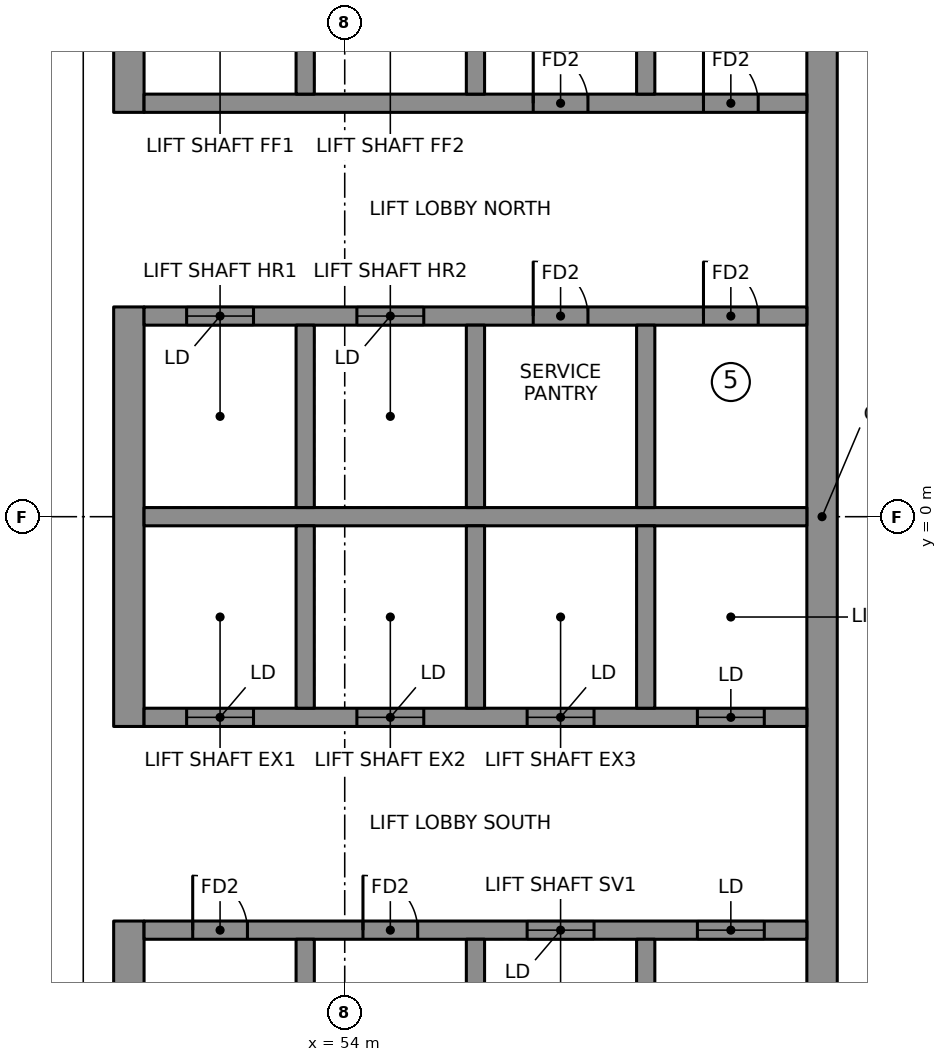
"""IFC4 building model, lengths in metres.
Left out: names, types, materials, properties, quantities, classifications, styles, units other than length and angle.
Written with IfcOpenShell. Run it as: python <this file> out.ifc"""

import sys

from ifc_helpers import new_model, si_unit, direction, frame, frame_2d, origin, place, context, subcontext, project, spatial, rectangle, extrude, element, fill, save


model = new_model("IFC4")
c1 = context("Model", 3, precision=1e-05, world=origin(), true_north=direction((0.0, 1.0)))
c2 = subcontext(c1, "Body", "Model", "MODEL_VIEW")
j1 = project(units=[si_unit("LENGTHUNIT", "METRE"), si_unit("PLANEANGLEUNIT", "RADIAN")], contexts=[c1])
p1 = place(None, origin())
s1 = spatial("IfcSite", under=j1, at=p1, CompositionType="ELEMENT")
p2 = place(p1, origin())
s2 = spatial("IfcBuilding", under=s1, at=p2, CompositionType="ELEMENT")
p3 = place(p2, frame((0.0, 0.0, 318.6)))
s3 = spatial("IfcBuildingStorey", under=s2, at=p3, CompositionType="ELEMENT", Elevation=318.6)
p4 = place(p3, frame((50.45, 6.65, 0.0), z_axis=(0.0, 0.0, 1.0), x_axis=(0.0, 1.0, 0.0)))
e1 = element("IfcWall", 1, at=p4, inside=s3, PredefinedType="SHEAR", context=c2, shape_type="SweptSolid", body=[
    extrude(rectangle(XDim=9.6, YDim=0.5, at=frame_2d((4.8, 0.0))), origin(), (0.0, 0.0, 1.0), 4.4),
])
p5 = place(p4, frame((6.5, 0.0, 0.0)))
e2 = element("IfcOpeningElement", 2, at=p5, cuts=e1, PredefinedType="OPENING", context=c2, shape_type="SweptSolid", body=[
    extrude(rectangle(XDim=1.1, YDim=2.1, at=frame_2d((0.55, 1.05))), frame((0.0, 0.26, 0.0), z_axis=(0.0, -1.0, 0.0), x_axis=(1.0, 0.0, 0.0)), (0.0, 0.0, 1.0), 0.52),
])
p6 = place(p3, frame((50.45, -3.45, 0.0), z_axis=(0.0, 0.0, 1.0), x_axis=(0.0, 1.0, 0.0)))
e3 = element("IfcWall", 3, at=p6, inside=s3, PredefinedType="SHEAR", context=c2, shape_type="SweptSolid", body=[
    extrude(rectangle(XDim=6.9, YDim=0.5, at=frame_2d((3.45, 0.0))), origin(), (0.0, 0.0, 1.0), 4.4),
])
p7 = place(p3, frame((50.45, -16.25, 0.0), z_axis=(0.0, 0.0, 1.0), x_axis=(0.0, 1.0, 0.0)))
e4 = element("IfcWall", 4, at=p7, inside=s3, PredefinedType="SHEAR", context=c2, shape_type="SweptSolid", body=[
    extrude(rectangle(XDim=9.6, YDim=0.5, at=frame_2d((4.8, 0.0))), origin(), (0.0, 0.0, 1.0), 4.4),
])
p8 = place(p7, frame((2.0, 0.0, 0.0)))
e5 = element("IfcOpeningElement", 5, at=p8, cuts=e4, PredefinedType="OPENING", context=c2, shape_type="SweptSolid", body=[
    extrude(rectangle(XDim=1.1, YDim=2.1, at=frame_2d((0.55, 1.05))), frame((0.0, 0.26, 0.0), z_axis=(0.0, -1.0, 0.0), x_axis=(1.0, 0.0, 0.0)), (0.0, 0.0, 1.0), 0.52),
])
p9 = place(p3, frame((61.85, -9.95, 0.0), z_axis=(0.0, 0.0, 1.0), x_axis=(0.0, 1.0, 0.0)))
e6 = element("IfcWall", 6, at=p9, inside=s3, PredefinedType="SHEAR", context=c2, shape_type="SweptSolid", body=[
    extrude(rectangle(XDim=19.9, YDim=0.5, at=frame_2d((9.95, 0.0))), origin(), (0.0, 0.0, 1.0), 4.4),
])
p10 = place(p3, frame((50.7, 0.0, 0.0), z_axis=(0.0, 0.0, 1.0), x_axis=(1.0, 0.0, 0.0)))
e7 = element("IfcWall", 7, at=p10, inside=s3, PredefinedType="SHEAR", context=c2, shape_type="SweptSolid", body=[
    extrude(rectangle(XDim=10.9, YDim=0.3, at=frame_2d((5.45, 0.0))), origin(), (0.0, 0.0, 1.0), 4.4),
])
p11 = place(p3, frame((50.7, 3.3, 0.0), z_axis=(0.0, 0.0, 1.0), x_axis=(1.0, 0.0, 0.0)))
e8 = element("IfcWall", 8, at=p11, inside=s3, PredefinedType="SHEAR", context=c2, shape_type="SweptSolid", body=[
    extrude(rectangle(XDim=10.9, YDim=0.3, at=frame_2d((5.45, 0.0))), origin(), (0.0, 0.0, 1.0), 4.4),
])
p12 = place(p11, frame((0.7, 0.0, 0.0)))
e9 = element("IfcOpeningElement", 9, at=p12, cuts=e8, PredefinedType="OPENING", context=c2, shape_type="SweptSolid", body=[
    extrude(rectangle(XDim=1.1, YDim=2.1, at=frame_2d((0.55, 1.05))), frame((0.0, 0.16, 0.0), z_axis=(0.0, -1.0, 0.0), x_axis=(1.0, 0.0, 0.0)), (0.0, 0.0, 1.0), 0.32),
])
p13 = place(p11, frame((3.5, 0.0, 0.0)))
e10 = element("IfcOpeningElement", 10, at=p13, cuts=e8, PredefinedType="OPENING", context=c2, shape_type="SweptSolid", body=[
    extrude(rectangle(XDim=1.1, YDim=2.1, at=frame_2d((0.55, 1.05))), frame((0.0, 0.16, 0.0), z_axis=(0.0, -1.0, 0.0), x_axis=(1.0, 0.0, 0.0)), (0.0, 0.0, 1.0), 0.32),
])
p14 = place(p11, frame((6.4, 0.0, 0.0)))
e11 = element("IfcOpeningElement", 11, at=p14, cuts=e8, PredefinedType="OPENING", context=c2, shape_type="SweptSolid", body=[
    extrude(rectangle(XDim=0.9, YDim=2.1, at=frame_2d((0.45, 1.05))), frame((0.0, 0.16, 0.0), z_axis=(0.0, -1.0, 0.0), x_axis=(1.0, 0.0, 0.0)), (0.0, 0.0, 1.0), 0.32),
])
p15 = place(p11, frame((9.2, 0.0, 0.0)))
e12 = element("IfcOpeningElement", 12, at=p15, cuts=e8, PredefinedType="OPENING", context=c2, shape_type="SweptSolid", body=[
    extrude(rectangle(XDim=0.9, YDim=2.1, at=frame_2d((0.45, 1.05))), frame((0.0, 0.16, 0.0), z_axis=(0.0, -1.0, 0.0), x_axis=(1.0, 0.0, 0.0)), (0.0, 0.0, 1.0), 0.32),
])
p16 = place(p3, frame((50.7, 6.8, 0.0), z_axis=(0.0, 0.0, 1.0), x_axis=(1.0, 0.0, 0.0)))
e13 = element("IfcWall", 13, at=p16, inside=s3, PredefinedType="SHEAR", context=c2, shape_type="SweptSolid", body=[
    extrude(rectangle(XDim=10.9, YDim=0.3, at=frame_2d((5.45, 0.0))), origin(), (0.0, 0.0, 1.0), 4.4),
])
p17 = place(p16, frame((6.4, 0.0, 0.0)))
e14 = element("IfcOpeningElement", 14, at=p17, cuts=e13, PredefinedType="OPENING", context=c2, shape_type="SweptSolid", body=[
    extrude(rectangle(XDim=0.9, YDim=2.1, at=frame_2d((0.45, 1.05))), frame((0.0, 0.16, 0.0), z_axis=(0.0, -1.0, 0.0), x_axis=(1.0, 0.0, 0.0)), (0.0, 0.0, 1.0), 0.32),
])
p18 = place(p16, frame((9.2, 0.0, 0.0)))
e15 = element("IfcOpeningElement", 15, at=p18, cuts=e13, PredefinedType="OPENING", context=c2, shape_type="SweptSolid", body=[
    extrude(rectangle(XDim=0.9, YDim=2.1, at=frame_2d((0.45, 1.05))), frame((0.0, 0.16, 0.0), z_axis=(0.0, -1.0, 0.0), x_axis=(1.0, 0.0, 0.0)), (0.0, 0.0, 1.0), 0.32),
])
for number, where, z_axis, x_axis in (
    (16, (53.35, 0.15, 0.0), (0.0, 0.0, 1.0), (0.0, 1.0, 0.0)),
    (17, (53.35, 6.95, 0.0), (0.0, 0.0, 1.0), (0.0, 1.0, 0.0)),
    (18, (56.15, 0.15, 0.0), (0.0, 0.0, 1.0), (0.0, 1.0, 0.0)),
    (19, (56.15, 6.95, 0.0), (0.0, 0.0, 1.0), (0.0, 1.0, 0.0)),
    (20, (58.95, 0.15, 0.0), (0.0, 0.0, 1.0), (0.0, 1.0, 0.0)),
    (21, (58.95, 6.95, 0.0), (0.0, 0.0, 1.0), (0.0, 1.0, 0.0)),
):
    element("IfcWall", number, at=place(p3, frame(where, z_axis=z_axis, x_axis=x_axis)), inside=s3, PredefinedType="SHEAR", context=c2, shape_type="SweptSolid", body=[
        extrude(rectangle(XDim=3.0, YDim=0.3, at=frame_2d((1.5, 0.0))), origin(), (0.0, 0.0, 1.0), 4.4),
    ])
p19 = place(p3, frame((50.7, -3.3, 0.0), z_axis=(0.0, 0.0, 1.0), x_axis=(1.0, 0.0, 0.0)))
e22 = element("IfcWall", 22, at=p19, inside=s3, PredefinedType="SHEAR", context=c2, shape_type="SweptSolid", body=[
    extrude(rectangle(XDim=10.9, YDim=0.3, at=frame_2d((5.45, 0.0))), origin(), (0.0, 0.0, 1.0), 4.4),
])
p20 = place(p19, frame((0.7, 0.0, 0.0)))
e23 = element("IfcOpeningElement", 23, at=p20, cuts=e22, PredefinedType="OPENING", context=c2, shape_type="SweptSolid", body=[
    extrude(rectangle(XDim=1.1, YDim=2.1, at=frame_2d((0.55, 1.05))), frame((0.0, 0.16, 0.0), z_axis=(0.0, -1.0, 0.0), x_axis=(1.0, 0.0, 0.0)), (0.0, 0.0, 1.0), 0.32),
])
p21 = place(p19, frame((3.5, 0.0, 0.0)))
e24 = element("IfcOpeningElement", 24, at=p21, cuts=e22, PredefinedType="OPENING", context=c2, shape_type="SweptSolid", body=[
    extrude(rectangle(XDim=1.1, YDim=2.1, at=frame_2d((0.55, 1.05))), frame((0.0, 0.16, 0.0), z_axis=(0.0, -1.0, 0.0), x_axis=(1.0, 0.0, 0.0)), (0.0, 0.0, 1.0), 0.32),
])
p22 = place(p19, frame((6.3, 0.0, 0.0)))
e25 = element("IfcOpeningElement", 25, at=p22, cuts=e22, PredefinedType="OPENING", context=c2, shape_type="SweptSolid", body=[
    extrude(rectangle(XDim=1.1, YDim=2.1, at=frame_2d((0.55, 1.05))), frame((0.0, 0.16, 0.0), z_axis=(0.0, -1.0, 0.0), x_axis=(1.0, 0.0, 0.0)), (0.0, 0.0, 1.0), 0.32),
])
p23 = place(p19, frame((9.1, 0.0, 0.0)))
e26 = element("IfcOpeningElement", 26, at=p23, cuts=e22, PredefinedType="OPENING", context=c2, shape_type="SweptSolid", body=[
    extrude(rectangle(XDim=1.1, YDim=2.1, at=frame_2d((0.55, 1.05))), frame((0.0, 0.16, 0.0), z_axis=(0.0, -1.0, 0.0), x_axis=(1.0, 0.0, 0.0)), (0.0, 0.0, 1.0), 0.32),
])
p24 = place(p3, frame((50.7, -6.8, 0.0), z_axis=(0.0, 0.0, 1.0), x_axis=(1.0, 0.0, 0.0)))
e27 = element("IfcWall", 27, at=p24, inside=s3, PredefinedType="SHEAR", context=c2, shape_type="SweptSolid", body=[
    extrude(rectangle(XDim=10.9, YDim=0.3, at=frame_2d((5.45, 0.0))), origin(), (0.0, 0.0, 1.0), 4.4),
])
p25 = place(p24, frame((6.3, 0.0, 0.0)))
e28 = element("IfcOpeningElement", 28, at=p25, cuts=e27, PredefinedType="OPENING", context=c2, shape_type="SweptSolid", body=[
    extrude(rectangle(XDim=1.1, YDim=2.1, at=frame_2d((0.55, 1.05))), frame((0.0, 0.16, 0.0), z_axis=(0.0, -1.0, 0.0), x_axis=(1.0, 0.0, 0.0)), (0.0, 0.0, 1.0), 0.32),
])
p26 = place(p24, frame((9.1, 0.0, 0.0)))
e29 = element("IfcOpeningElement", 29, at=p26, cuts=e27, PredefinedType="OPENING", context=c2, shape_type="SweptSolid", body=[
    extrude(rectangle(XDim=1.1, YDim=2.1, at=frame_2d((0.55, 1.05))), frame((0.0, 0.16, 0.0), z_axis=(0.0, -1.0, 0.0), x_axis=(1.0, 0.0, 0.0)), (0.0, 0.0, 1.0), 0.32),
])
p27 = place(p24, frame((0.8, 0.0, 0.0)))
e30 = element("IfcOpeningElement", 30, at=p27, cuts=e27, PredefinedType="OPENING", context=c2, shape_type="SweptSolid", body=[
    extrude(rectangle(XDim=0.9, YDim=2.1, at=frame_2d((0.45, 1.05))), frame((0.0, 0.16, 0.0), z_axis=(0.0, -1.0, 0.0), x_axis=(1.0, 0.0, 0.0)), (0.0, 0.0, 1.0), 0.32),
])
p28 = place(p24, frame((3.6, 0.0, 0.0)))
e31 = element("IfcOpeningElement", 31, at=p28, cuts=e27, PredefinedType="OPENING", context=c2, shape_type="SweptSolid", body=[
    extrude(rectangle(XDim=0.9, YDim=2.1, at=frame_2d((0.45, 1.05))), frame((0.0, 0.16, 0.0), z_axis=(0.0, -1.0, 0.0), x_axis=(1.0, 0.0, 0.0)), (0.0, 0.0, 1.0), 0.32),
])
for number, where, z_axis, x_axis in (
    (32, (53.35, -3.15, 0.0), (0.0, 0.0, 1.0), (0.0, 1.0, 0.0)),
    (33, (53.35, -9.95, 0.0), (0.0, 0.0, 1.0), (0.0, 1.0, 0.0)),
    (34, (56.15, -3.15, 0.0), (0.0, 0.0, 1.0), (0.0, 1.0, 0.0)),
    (35, (56.15, -9.95, 0.0), (0.0, 0.0, 1.0), (0.0, 1.0, 0.0)),
    (36, (58.95, -3.15, 0.0), (0.0, 0.0, 1.0), (0.0, 1.0, 0.0)),
    (37, (58.95, -9.95, 0.0), (0.0, 0.0, 1.0), (0.0, 1.0, 0.0)),
):
    element("IfcWall", number, at=place(p3, frame(where, z_axis=z_axis, x_axis=x_axis)), inside=s3, PredefinedType="SHEAR", context=c2, shape_type="SweptSolid", body=[
        extrude(rectangle(XDim=3.0, YDim=0.3, at=frame_2d((1.5, 0.0))), origin(), (0.0, 0.0, 1.0), 4.4),
    ])
p29 = place(p12, origin())
e38 = element("IfcDoor", 38, at=p29, inside=s3, OperationType="DOUBLE_DOOR_SLIDING", PredefinedType="DOOR", context=c2, shape_type="SweptSolid", body=[
    extrude(rectangle(XDim=1.1, YDim=2.1, at=frame_2d((0.55, 1.05))), frame((0.0, 0.025, 0.0), z_axis=(0.0, -1.0, 0.0), x_axis=(1.0, 0.0, 0.0)), (0.0, 0.0, 1.0), 0.05),
])
fill(e9, e38)
p30 = place(p13, origin())
e39 = element("IfcDoor", 39, at=p30, inside=s3, OperationType="DOUBLE_DOOR_SLIDING", PredefinedType="DOOR", context=c2, shape_type="SweptSolid", body=[
    extrude(rectangle(XDim=1.1, YDim=2.1, at=frame_2d((0.55, 1.05))), frame((0.0, 0.025, 0.0), z_axis=(0.0, -1.0, 0.0), x_axis=(1.0, 0.0, 0.0)), (0.0, 0.0, 1.0), 0.05),
])
fill(e10, e39)
p31 = place(p20, origin())
e40 = element("IfcDoor", 40, at=p31, inside=s3, OperationType="DOUBLE_DOOR_SLIDING", PredefinedType="DOOR", context=c2, shape_type="SweptSolid", body=[
    extrude(rectangle(XDim=1.1, YDim=2.1, at=frame_2d((0.55, 1.05))), frame((0.0, 0.025, 0.0), z_axis=(0.0, -1.0, 0.0), x_axis=(1.0, 0.0, 0.0)), (0.0, 0.0, 1.0), 0.05),
])
fill(e23, e40)
p32 = place(p21, origin())
e41 = element("IfcDoor", 41, at=p32, inside=s3, OperationType="DOUBLE_DOOR_SLIDING", PredefinedType="DOOR", context=c2, shape_type="SweptSolid", body=[
    extrude(rectangle(XDim=1.1, YDim=2.1, at=frame_2d((0.55, 1.05))), frame((0.0, 0.025, 0.0), z_axis=(0.0, -1.0, 0.0), x_axis=(1.0, 0.0, 0.0)), (0.0, 0.0, 1.0), 0.05),
])
fill(e24, e41)
p33 = place(p22, origin())
e42 = element("IfcDoor", 42, at=p33, inside=s3, OperationType="DOUBLE_DOOR_SLIDING", PredefinedType="DOOR", context=c2, shape_type="SweptSolid", body=[
    extrude(rectangle(XDim=1.1, YDim=2.1, at=frame_2d((0.55, 1.05))), frame((0.0, 0.025, 0.0), z_axis=(0.0, -1.0, 0.0), x_axis=(1.0, 0.0, 0.0)), (0.0, 0.0, 1.0), 0.05),
])
fill(e25, e42)
p34 = place(p23, origin())
e43 = element("IfcDoor", 43, at=p34, inside=s3, OperationType="DOUBLE_DOOR_SLIDING", PredefinedType="DOOR", context=c2, shape_type="SweptSolid", body=[
    extrude(rectangle(XDim=1.1, YDim=2.1, at=frame_2d((0.55, 1.05))), frame((0.0, 0.025, 0.0), z_axis=(0.0, -1.0, 0.0), x_axis=(1.0, 0.0, 0.0)), (0.0, 0.0, 1.0), 0.05),
])
fill(e26, e43)
p35 = place(p25, origin())
e44 = element("IfcDoor", 44, at=p35, inside=s3, OperationType="DOUBLE_DOOR_SLIDING", PredefinedType="DOOR", context=c2, shape_type="SweptSolid", body=[
    extrude(rectangle(XDim=1.1, YDim=2.1, at=frame_2d((0.55, 1.05))), frame((0.0, 0.025, 0.0), z_axis=(0.0, -1.0, 0.0), x_axis=(1.0, 0.0, 0.0)), (0.0, 0.0, 1.0), 0.05),
])
fill(e28, e44)
p36 = place(p26, origin())
e45 = element("IfcDoor", 45, at=p36, inside=s3, OperationType="DOUBLE_DOOR_SLIDING", PredefinedType="DOOR", context=c2, shape_type="SweptSolid", body=[
    extrude(rectangle(XDim=1.1, YDim=2.1, at=frame_2d((0.55, 1.05))), frame((0.0, 0.025, 0.0), z_axis=(0.0, -1.0, 0.0), x_axis=(1.0, 0.0, 0.0)), (0.0, 0.0, 1.0), 0.05),
])
fill(e29, e45)
p37 = place(p17, origin())
e46 = element("IfcDoor", 46, at=p37, inside=s3, OperationType="SINGLE_SWING_LEFT", PredefinedType="DOOR", context=c2, shape_type="SweptSolid", body=[
    extrude(rectangle(XDim=0.9, YDim=2.1, at=frame_2d((0.45, 1.05))), frame((0.0, 0.025, 0.0), z_axis=(0.0, -1.0, 0.0), x_axis=(1.0, 0.0, 0.0)), (0.0, 0.0, 1.0), 0.05),
])
fill(e14, e46)
p38 = place(p18, origin())
e47 = element("IfcDoor", 47, at=p38, inside=s3, OperationType="SINGLE_SWING_LEFT", PredefinedType="DOOR", context=c2, shape_type="SweptSolid", body=[
    extrude(rectangle(XDim=0.9, YDim=2.1, at=frame_2d((0.45, 1.05))), frame((0.0, 0.025, 0.0), z_axis=(0.0, -1.0, 0.0), x_axis=(1.0, 0.0, 0.0)), (0.0, 0.0, 1.0), 0.05),
])
fill(e15, e47)
p39 = place(p14, origin())
e48 = element("IfcDoor", 48, at=p39, inside=s3, OperationType="SINGLE_SWING_LEFT", PredefinedType="DOOR", context=c2, shape_type="SweptSolid", body=[
    extrude(rectangle(XDim=0.9, YDim=2.1, at=frame_2d((0.45, 1.05))), frame((0.0, 0.025, 0.0), z_axis=(0.0, -1.0, 0.0), x_axis=(1.0, 0.0, 0.0)), (0.0, 0.0, 1.0), 0.05),
])
fill(e11, e48)
p40 = place(p15, origin())
e49 = element("IfcDoor", 49, at=p40, inside=s3, OperationType="SINGLE_SWING_LEFT", PredefinedType="DOOR", context=c2, shape_type="SweptSolid", body=[
    extrude(rectangle(XDim=0.9, YDim=2.1, at=frame_2d((0.45, 1.05))), frame((0.0, 0.025, 0.0), z_axis=(0.0, -1.0, 0.0), x_axis=(1.0, 0.0, 0.0)), (0.0, 0.0, 1.0), 0.05),
])
fill(e12, e49)
p41 = place(p27, origin())
e50 = element("IfcDoor", 50, at=p41, inside=s3, OperationType="SINGLE_SWING_LEFT", PredefinedType="DOOR", context=c2, shape_type="SweptSolid", body=[
    extrude(rectangle(XDim=0.9, YDim=2.1, at=frame_2d((0.45, 1.05))), frame((0.0, 0.025, 0.0), z_axis=(0.0, -1.0, 0.0), x_axis=(1.0, 0.0, 0.0)), (0.0, 0.0, 1.0), 0.05),
])
fill(e30, e50)
p42 = place(p28, origin())
e51 = element("IfcDoor", 51, at=p42, inside=s3, OperationType="SINGLE_SWING_LEFT", PredefinedType="DOOR", context=c2, shape_type="SweptSolid", body=[
    extrude(rectangle(XDim=0.9, YDim=2.1, at=frame_2d((0.45, 1.05))), frame((0.0, 0.025, 0.0), z_axis=(0.0, -1.0, 0.0), x_axis=(1.0, 0.0, 0.0)), (0.0, 0.0, 1.0), 0.05),
])
fill(e31, e51)
save(model, sys.argv[1])
